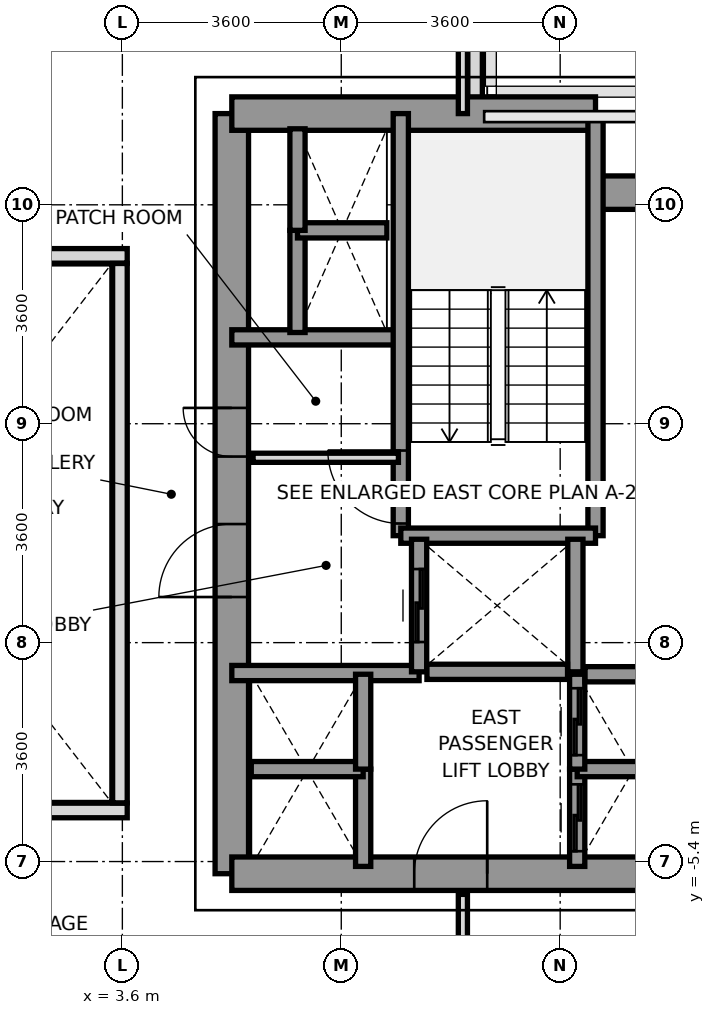
"""IFC4 building model, lengths in metres.
Left out: names, types, materials, properties, quantities, classifications, styles, units other than length and angle.
Written with IfcOpenShell. Run it as: python <this file> out.ifc"""

import sys

from ifc_helpers import new_model, si_unit, direction, frame, frame_2d, origin, place, context, subcontext, project, spatial, rectangle, extrude, source, transform, mapped, element, fill, save


model = new_model("IFC4")
c1 = context("Model", 3, precision=1e-05, world=origin(), true_north=direction((0.0, 1.0)))
c2 = subcontext(c1, "Body", "Model", "MODEL_VIEW")
j1 = project(units=[si_unit("LENGTHUNIT", "METRE"), si_unit("PLANEANGLEUNIT", "RADIAN")], contexts=[c1])
p1 = place(None, origin())
s1 = spatial("IfcSite", under=j1, at=p1, CompositionType="ELEMENT")
p2 = place(p1, origin())
s2 = spatial("IfcBuilding", under=s1, at=p2, CompositionType="ELEMENT")
p3 = place(p2, frame((0.0, 0.0, 30.6)))
s3 = spatial("IfcBuildingStorey", under=s2, at=p3, CompositionType="ELEMENT", Elevation=30.6)
p4 = place(p3, frame((9.4, 8.397, 0.0), z_axis=(0.0, 0.0, 1.0), x_axis=(0.0, -1.0, 0.0)))
e1 = element("IfcWall", 1, at=p4, inside=s3, PredefinedType="PARAPET", context=c2, shape_type="SweptSolid", body=[
    extrude(rectangle(XDim=1.444, YDim=0.24, at=frame_2d((0.722, 0.0))), origin(), (0.0, 0.0, 1.0), 1.15),
])
p5 = place(p3, frame((5.4, -5.6, 0.0), z_axis=(0.0, 0.0, 1.0), x_axis=(0.0, 1.0, 0.0)))
e2 = element("IfcWall", 2, at=p5, inside=s3, PredefinedType="SHEAR", context=c2, shape_type="SweptSolid", body=[
    extrude(rectangle(XDim=12.5, YDim=0.55, at=frame_2d((6.25, 0.0))), origin(), (0.0, 0.0, 1.0), 3.2),
])
p6 = place(p5, frame((4.55, 0.0, 0.0)))
e3 = element("IfcOpeningElement", 3, at=p6, cuts=e2, PredefinedType="OPENING", context=c2, shape_type="SweptSolid", body=[
    extrude(rectangle(XDim=1.2, YDim=2.2, at=frame_2d((0.6, 1.1))), frame((0.0, 0.285, 0.0), z_axis=(0.0, -1.0, 0.0), x_axis=(1.0, 0.0, 0.0)), (0.0, 0.0, 1.0), 0.57),
])
p7 = place(p5, frame((6.86, 0.0, 0.0)))
e4 = element("IfcOpeningElement", 4, at=p7, cuts=e2, PredefinedType="OPENING", context=c2, shape_type="SweptSolid", body=[
    extrude(rectangle(XDim=0.8, YDim=2.1, at=frame_2d((0.4, 1.05))), frame((0.0, 0.285, 0.0), z_axis=(0.0, -1.0, 0.0), x_axis=(1.0, 0.0, 0.0)), (0.0, 0.0, 1.0), 0.57),
])
p8 = place(p3, frame((5.4, 6.9, 0.0), z_axis=(0.0, 0.0, 1.0), x_axis=(1.0, 0.0, 0.0)))
e5 = element("IfcWall", 5, at=p8, inside=s3, PredefinedType="SHEAR", context=c2, shape_type="SweptSolid", body=[
    extrude(rectangle(XDim=5.981, YDim=0.55, at=frame_2d((2.991, 0.0))), origin(), (0.0, 0.0, 1.0), 3.2),
])
p9 = place(p3, frame((11.381, 5.6, 0.0), z_axis=(0.0, 0.0, 1.0), x_axis=(1.0, 0.0, 0.0)))
e6 = element("IfcWall", 6, at=p9, inside=s3, PredefinedType="SHEAR", context=c2, shape_type="SweptSolid", body=[
    extrude(rectangle(XDim=1.819, YDim=0.55, at=frame_2d((0.909, 0.0))), origin(), (0.0, 0.0, 1.0), 3.2),
])
p10 = place(p3, frame((5.4, -5.6, 0.0), z_axis=(0.0, 0.0, 1.0), x_axis=(1.0, 0.0, 0.0)))
e7 = element("IfcWall", 7, at=p10, inside=s3, PredefinedType="SHEAR", context=c2, shape_type="SweptSolid", body=[
    extrude(rectangle(XDim=7.8, YDim=0.55, at=frame_2d((3.9, 0.0))), origin(), (0.0, 0.0, 1.0), 3.2),
])
p11 = place(p10, frame((3.0, 0.0, 0.0)))
e8 = element("IfcOpeningElement", 8, at=p11, cuts=e7, PredefinedType="OPENING", context=c2, shape_type="SweptSolid", body=[
    extrude(rectangle(XDim=1.2, YDim=2.2, at=frame_2d((0.6, 1.1))), frame((0.0, 0.285, 0.0), z_axis=(0.0, -1.0, 0.0), x_axis=(1.0, 0.0, 0.0)), (0.0, 0.0, 1.0), 0.57),
])
p12 = place(p3, frame((5.4, 3.22, 0.0), z_axis=(0.0, 0.0, 1.0), x_axis=(1.0, 0.0, 0.0)))
e9 = element("IfcWall", 9, at=p12, inside=s3, PredefinedType="SOLIDWALL", context=c2, shape_type="SweptSolid", body=[
    extrude(rectangle(XDim=2.78, YDim=0.25, at=frame_2d((1.39, 0.0))), origin(), (0.0, 0.0, 1.0), 3.2),
])
p13 = place(p3, frame((5.4, -2.3, 0.0), z_axis=(0.0, 0.0, 1.0), x_axis=(1.0, 0.0, 0.0)))
e10 = element("IfcWall", 10, at=p13, inside=s3, PredefinedType="SOLIDWALL", context=c2, shape_type="SweptSolid", body=[
    extrude(rectangle(XDim=3.08, YDim=0.25, at=frame_2d((1.54, 0.0))), origin(), (0.0, 0.0, 1.0), 3.2),
])
p14 = place(p3, frame((8.179, -0.041, 0.0), z_axis=(0.0, 0.0, 1.0), x_axis=(0.0, 1.0, 0.0)))
e11 = element("IfcWall", 11, at=p14, inside=s3, PredefinedType="SOLIDWALL", context=c2, shape_type="SweptSolid", body=[
    extrude(rectangle(XDim=6.941, YDim=0.25, at=frame_2d((3.47, 0.0))), origin(), (0.0, 0.0, 1.0), 3.2),
])
p15 = place(p14, frame((0.2, 0.0, 0.0)))
e12 = element("IfcOpeningElement", 12, at=p15, cuts=e11, PredefinedType="OPENING", context=c2, shape_type="SweptSolid", body=[
    extrude(rectangle(XDim=1.2, YDim=2.2, at=frame_2d((0.6, 1.1))), frame((0.0, 0.135, 0.0), z_axis=(0.0, -1.0, 0.0), x_axis=(1.0, 0.0, 0.0)), (0.0, 0.0, 1.0), 0.27),
])
p16 = place(p3, frame((11.381, -0.041, 0.0), z_axis=(0.0, 0.0, 1.0), x_axis=(0.0, 1.0, 0.0)))
e13 = element("IfcWall", 13, at=p16, inside=s3, PredefinedType="SOLIDWALL", context=c2, shape_type="SweptSolid", body=[
    extrude(rectangle(XDim=6.941, YDim=0.25, at=frame_2d((3.47, 0.0))), origin(), (0.0, 0.0, 1.0), 3.2),
])
p17 = place(p3, frame((8.179, -0.041, 0.0), z_axis=(0.0, 0.0, 1.0), x_axis=(1.0, 0.0, 0.0)))
e14 = element("IfcWall", 14, at=p17, inside=s3, PredefinedType="SOLIDWALL", context=c2, shape_type="SweptSolid", body=[
    extrude(rectangle(XDim=3.202, YDim=0.25, at=frame_2d((1.601, 0.0))), origin(), (0.0, 0.0, 1.0), 3.2),
])
p18 = place(p3, frame((8.48, -2.28, 0.0), z_axis=(0.0, 0.0, 1.0), x_axis=(0.0, 1.0, 0.0)))
e15 = element("IfcWall", 15, at=p18, inside=s3, PredefinedType="SOLIDWALL", context=c2, shape_type="SweptSolid", body=[
    extrude(rectangle(XDim=2.18, YDim=0.25, at=frame_2d((1.09, 0.0))), origin(), (0.0, 0.0, 1.0), 3.2),
])
p19 = place(p18, frame((0.49, 0.0, 0.0)))
e16 = element("IfcOpeningElement", 16, at=p19, cuts=e15, PredefinedType="OPENING", context=c2, shape_type="SweptSolid", body=[
    extrude(rectangle(XDim=1.2, YDim=2.2, at=frame_2d((0.6, 1.1))), frame((0.0, 0.135, 0.0), z_axis=(0.0, -1.0, 0.0), x_axis=(1.0, 0.0, 0.0)), (0.0, 0.0, 1.0), 0.27),
])
p20 = place(p3, frame((11.05, -2.28, 0.0), z_axis=(0.0, 0.0, 1.0), x_axis=(0.0, 1.0, 0.0)))
e17 = element("IfcWall", 17, at=p20, inside=s3, PredefinedType="SOLIDWALL", context=c2, shape_type="SweptSolid", body=[
    extrude(rectangle(XDim=2.18, YDim=0.25, at=frame_2d((1.09, 0.0))), origin(), (0.0, 0.0, 1.0), 3.2),
])
p21 = place(p3, frame((8.609, -2.28, 0.0), z_axis=(0.0, 0.0, 1.0), x_axis=(1.0, 0.0, 0.0)))
e18 = element("IfcWall", 18, at=p21, inside=s3, PredefinedType="SOLIDWALL", context=c2, shape_type="SweptSolid", body=[
    extrude(rectangle(XDim=2.312, YDim=0.25, at=frame_2d((1.156, 0.0))), origin(), (0.0, 0.0, 1.0), 3.2),
])
p22 = place(p3, frame((11.08, -5.48, 0.0), z_axis=(0.0, 0.0, 1.0), x_axis=(0.0, 1.0, 0.0)))
e19 = element("IfcWall", 19, at=p22, inside=s3, PredefinedType="SOLIDWALL", context=c2, shape_type="SweptSolid", body=[
    extrude(rectangle(XDim=1.6, YDim=0.25, at=frame_2d((0.8, 0.0))), origin(), (0.0, 0.0, 1.0), 3.2),
])
p23 = place(p22, frame((0.25, 0.0, 0.0)))
e20 = element("IfcOpeningElement", 20, at=p23, cuts=e19, PredefinedType="OPENING", context=c2, shape_type="SweptSolid", body=[
    extrude(rectangle(XDim=1.1, YDim=2.2, at=frame_2d((0.55, 1.1))), frame((0.0, 0.135, 0.0), z_axis=(0.0, -1.0, 0.0), x_axis=(1.0, 0.0, 0.0)), (0.0, 0.0, 1.0), 0.27),
])
p24 = place(p3, frame((11.08, -3.88, 0.0), z_axis=(0.0, 0.0, 1.0), x_axis=(1.0, 0.0, 0.0)))
e21 = element("IfcWall", 21, at=p24, inside=s3, PredefinedType="SOLIDWALL", context=c2, shape_type="SweptSolid", body=[
    extrude(rectangle(XDim=1.84, YDim=0.25, at=frame_2d((0.92, 0.0))), origin(), (0.0, 0.0, 1.0), 3.2),
])
p25 = place(p3, frame((11.08, -3.88, 0.0), z_axis=(0.0, 0.0, 1.0), x_axis=(0.0, 1.0, 0.0)))
e22 = element("IfcWall", 22, at=p25, inside=s3, PredefinedType="SOLIDWALL", context=c2, shape_type="SweptSolid", body=[
    extrude(rectangle(XDim=1.56, YDim=0.25, at=frame_2d((0.78, 0.0))), origin(), (0.0, 0.0, 1.0), 3.2),
])
p26 = place(p25, frame((0.23, 0.0, 0.0)))
e23 = element("IfcOpeningElement", 23, at=p26, cuts=e22, PredefinedType="OPENING", context=c2, shape_type="SweptSolid", body=[
    extrude(rectangle(XDim=1.1, YDim=2.2, at=frame_2d((0.55, 1.1))), frame((0.0, 0.135, 0.0), z_axis=(0.0, -1.0, 0.0), x_axis=(1.0, 0.0, 0.0)), (0.0, 0.0, 1.0), 0.27),
])
p27 = place(p3, frame((11.209, -2.32, 0.0), z_axis=(0.0, 0.0, 1.0), x_axis=(1.0, 0.0, 0.0)))
e24 = element("IfcWall", 24, at=p27, inside=s3, PredefinedType="SOLIDWALL", context=c2, shape_type="SweptSolid", body=[
    extrude(rectangle(XDim=1.582, YDim=0.25, at=frame_2d((0.791, 0.0))), origin(), (0.0, 0.0, 1.0), 3.2),
])
p28 = place(p3, frame((7.56, -5.48, 0.0), z_axis=(0.0, 0.0, 1.0), x_axis=(0.0, 1.0, 0.0)))
e25 = element("IfcWall", 25, at=p28, inside=s3, PredefinedType="SOLIDWALL", context=c2, shape_type="SweptSolid", body=[
    extrude(rectangle(XDim=1.6, YDim=0.25, at=frame_2d((0.8, 0.0))), origin(), (0.0, 0.0, 1.0), 3.2),
])
p29 = place(p3, frame((5.72, -3.88, 0.0), z_axis=(0.0, 0.0, 1.0), x_axis=(1.0, 0.0, 0.0)))
e26 = element("IfcWall", 26, at=p29, inside=s3, PredefinedType="SOLIDWALL", context=c2, shape_type="SweptSolid", body=[
    extrude(rectangle(XDim=1.84, YDim=0.25, at=frame_2d((0.92, 0.0))), origin(), (0.0, 0.0, 1.0), 3.2),
])
p30 = place(p3, frame((7.56, -3.88, 0.0), z_axis=(0.0, 0.0, 1.0), x_axis=(0.0, 1.0, 0.0)))
e27 = element("IfcWall", 27, at=p30, inside=s3, PredefinedType="SOLIDWALL", context=c2, shape_type="SweptSolid", body=[
    extrude(rectangle(XDim=1.56, YDim=0.25, at=frame_2d((0.78, 0.0))), origin(), (0.0, 0.0, 1.0), 3.2),
])
p31 = place(p3, frame((6.48, 3.3, 0.0), z_axis=(0.0, 0.0, 1.0), x_axis=(0.0, 1.0, 0.0)))
e28 = element("IfcWall", 28, at=p31, inside=s3, PredefinedType="SOLIDWALL", context=c2, shape_type="SweptSolid", body=[
    extrude(rectangle(XDim=1.68, YDim=0.25, at=frame_2d((0.84, 0.0))), origin(), (0.0, 0.0, 1.0), 3.2),
])
p32 = place(p3, frame((6.48, 4.98, 0.0), z_axis=(0.0, 0.0, 1.0), x_axis=(1.0, 0.0, 0.0)))
e29 = element("IfcWall", 29, at=p32, inside=s3, PredefinedType="SOLIDWALL", context=c2, shape_type="SweptSolid", body=[
    extrude(rectangle(XDim=1.47, YDim=0.25, at=frame_2d((0.735, 0.0))), origin(), (0.0, 0.0, 1.0), 3.2),
])
p33 = place(p3, frame((6.48, 4.98, 0.0), z_axis=(0.0, 0.0, 1.0), x_axis=(0.0, 1.0, 0.0)))
e30 = element("IfcWall", 30, at=p33, inside=s3, PredefinedType="SOLIDWALL", context=c2, shape_type="SweptSolid", body=[
    extrude(rectangle(XDim=1.67, YDim=0.25, at=frame_2d((0.835, 0.0))), origin(), (0.0, 0.0, 1.0), 3.2),
])
p34 = place(p3, frame((5.75, 1.24, 0.0), z_axis=(0.0, 0.0, 1.0), x_axis=(1.0, 0.0, 0.0)))
e31 = element("IfcWall", 31, at=p34, inside=s3, PredefinedType="PARTITIONING", context=c2, shape_type="SweptSolid", body=[
    extrude(rectangle(XDim=2.39, YDim=0.15, at=frame_2d((1.195, 0.0))), origin(), (0.0, 0.0, 1.0), 2.3),
])
p35 = place(p3, frame((9.2, 6.9, 0.0), z_axis=(0.0, 0.0, 1.0), x_axis=(0.0, 1.0, 0.0)))
e32 = element("IfcWall", 32, at=p35, inside=s3, PredefinedType="PARTITIONING", context=c2, shape_type="SweptSolid", body=[
    extrude(rectangle(XDim=8.78, YDim=0.15, at=frame_2d((4.39, 0.0))), origin(), (0.0, 0.0, 1.0), 2.65),
])
p36 = place(p3, frame((9.2, -15.68, 0.0), z_axis=(0.0, 0.0, 1.0), x_axis=(0.0, 1.0, 0.0)))
e33 = element("IfcWall", 33, at=p36, inside=s3, PredefinedType="PARTITIONING", context=c2, shape_type="SweptSolid", body=[
    extrude(rectangle(XDim=9.74, YDim=0.15, at=frame_2d((4.87, 0.0))), origin(), (0.0, 0.0, 1.0), 2.65),
])
for number, where, z_axis, x_axis in (
    (34, (-3.68, -4.56, 0.0), (0.0, 0.0, 1.0), (1.0, 0.0, 0.0)),
    (35, (-3.68, 4.56, 0.0), (0.0, 0.0, 1.0), (1.0, 0.0, 0.0)),
):
    element("IfcWall", number, at=place(p3, frame(where, z_axis=z_axis, x_axis=x_axis)), inside=s3, PredefinedType="PARAPET", context=c2, shape_type="SweptSolid", body=[
        extrude(rectangle(XDim=7.36, YDim=0.24, at=frame_2d((3.68, 0.0))), origin(), (0.0, 0.0, 1.0), 1.15),
    ])
p37 = place(p3, frame((3.56, -4.435, 0.0), z_axis=(0.0, 0.0, 1.0), x_axis=(0.0, 1.0, 0.0)))
e36 = element("IfcWall", 36, at=p37, inside=s3, PredefinedType="PARAPET", context=c2, shape_type="SweptSolid", body=[
    extrude(rectangle(XDim=8.87, YDim=0.24, at=frame_2d((4.435, 0.0))), origin(), (0.0, 0.0, 1.0), 1.15),
])
m1 = source(origin(), c2, "Body", "SweptSolid", [
    extrude(rectangle(XDim=1.2, YDim=2.2, at=frame_2d((0.6, 1.1))), frame((0.0, 0.025, 0.0), z_axis=(0.0, -1.0, 0.0), x_axis=(1.0, 0.0, 0.0)), (0.0, 0.0, 1.0), 0.05),
])
p38 = place(p15, origin())
e37 = element("IfcDoor", 37, at=p38, inside=s3, OperationType="SINGLE_SWING_RIGHT", PredefinedType="DOOR", context=c2, shape_type="MappedRepresentation", body=[
    mapped(m1, transform((0.0, 0.0, 0.0), x_axis=(1.0, 0.0, 0.0), y_axis=(0.0, 1.0, 0.0), z_axis=(0.0, 0.0, 1.0), scale=1.0)),
])
fill(e12, e37)
p39 = place(p6, origin())
e38 = element("IfcDoor", 38, at=p39, inside=s3, OperationType="SINGLE_SWING_LEFT", PredefinedType="DOOR", context=c2, shape_type="MappedRepresentation", body=[
    mapped(m1, transform((0.0, 0.0, 0.0), x_axis=(1.0, 0.0, 0.0), y_axis=(0.0, 1.0, 0.0), z_axis=(0.0, 0.0, 1.0), scale=1.0)),
])
fill(e3, e38)
p40 = place(p11, origin())
e39 = element("IfcDoor", 39, at=p40, inside=s3, OperationType="SINGLE_SWING_RIGHT", PredefinedType="DOOR", context=c2, shape_type="MappedRepresentation", body=[
    mapped(m1, transform((0.0, 0.0, 0.0), x_axis=(1.0, 0.0, 0.0), y_axis=(0.0, 1.0, 0.0), z_axis=(0.0, 0.0, 1.0), scale=1.0)),
])
fill(e8, e39)
m2 = source(origin(), c2, "Body", "SweptSolid", [
    extrude(rectangle(XDim=0.8, YDim=2.1, at=frame_2d((0.4, 1.05))), frame((0.0, 0.025, 0.0), z_axis=(0.0, -1.0, 0.0), x_axis=(1.0, 0.0, 0.0)), (0.0, 0.0, 1.0), 0.05),
])
p41 = place(p7, origin())
e40 = element("IfcDoor", 40, at=p41, inside=s3, OperationType="SINGLE_SWING_RIGHT", PredefinedType="DOOR", context=c2, shape_type="MappedRepresentation", body=[
    mapped(m2, transform((0.0, 0.0, 0.0), x_axis=(1.0, 0.0, 0.0), y_axis=(0.0, 1.0, 0.0), z_axis=(0.0, 0.0, 1.0), scale=1.0)),
])
fill(e4, e40)
p42 = place(p19, origin())
e41 = element("IfcDoor", 41, at=p42, inside=s3, OperationType="SLIDING_TO_RIGHT", PredefinedType="DOOR", context=c2, shape_type="MappedRepresentation", body=[
    mapped(m1, transform((0.0, 0.0, 0.0), x_axis=(1.0, 0.0, 0.0), y_axis=(0.0, 1.0, 0.0), z_axis=(0.0, 0.0, 1.0), scale=1.0)),
])
fill(e16, e41)
m3 = source(origin(), c2, "Body", "SweptSolid", [
    extrude(rectangle(XDim=1.1, YDim=2.2, at=frame_2d((0.55, 1.1))), frame((0.0, 0.025, 0.0), z_axis=(0.0, -1.0, 0.0), x_axis=(1.0, 0.0, 0.0)), (0.0, 0.0, 1.0), 0.05),
])
p43 = place(p23, origin())
e42 = element("IfcDoor", 42, at=p43, inside=s3, OperationType="SLIDING_TO_LEFT", PredefinedType="DOOR", context=c2, shape_type="MappedRepresentation", body=[
    mapped(m3, transform((0.0, 0.0, 0.0), x_axis=(1.0, 0.0, 0.0), y_axis=(0.0, 1.0, 0.0), z_axis=(0.0, 0.0, 1.0), scale=1.0)),
])
fill(e20, e42)
p44 = place(p26, origin())
e43 = element("IfcDoor", 43, at=p44, inside=s3, OperationType="SLIDING_TO_LEFT", PredefinedType="DOOR", context=c2, shape_type="MappedRepresentation", body=[
    mapped(m3, transform((0.0, 0.0, 0.0), x_axis=(1.0, 0.0, 0.0), y_axis=(0.0, 1.0, 0.0), z_axis=(0.0, 0.0, 1.0), scale=1.0)),
])
fill(e23, e43)
save(model, sys.argv[1])
